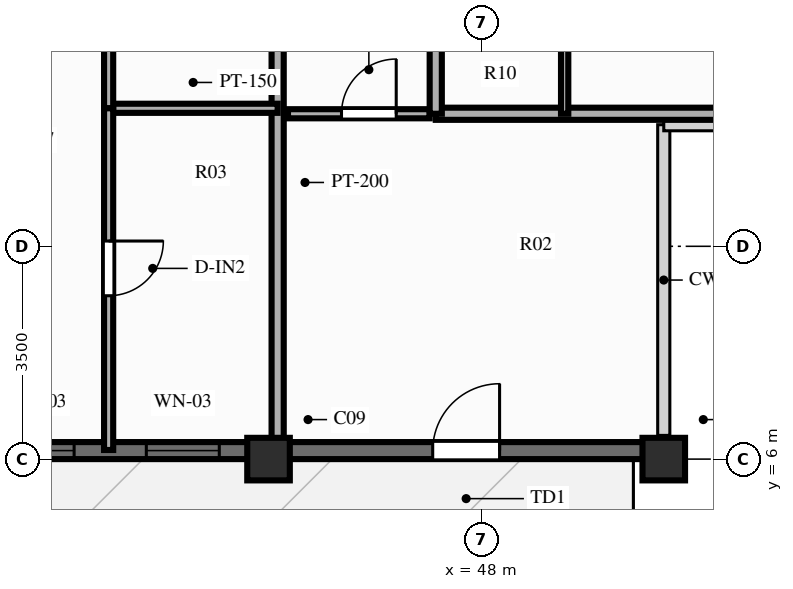
"""IFC4 building model, lengths in metres.
Left out: names, types, materials, properties, quantities, classifications, styles, units other than length and angle.
Written with IfcOpenShell. Run it as: python <this file> out.ifc"""

import sys

from ifc_helpers import new_model, si_unit, direction, frame, frame_2d, origin, origin_2d, place, context, subcontext, project, spatial, rectangle, extrude, source, transform, mapped, element, fill, save


model = new_model("IFC4")
c1 = context("Model", 3, precision=1e-05, world=origin(), true_north=direction((0.0, 1.0)))
c2 = subcontext(c1, "Body", "Model", "MODEL_VIEW")
j1 = project(units=[si_unit("LENGTHUNIT", "METRE"), si_unit("PLANEANGLEUNIT", "RADIAN")], contexts=[c1])
p1 = place(None, origin())
s1 = spatial("IfcSite", under=j1, at=p1, CompositionType="ELEMENT")
p2 = place(p1, origin())
s2 = spatial("IfcBuilding", under=s1, at=p2, CompositionType="ELEMENT")
p3 = place(p2, frame((0.0, 0.0, 216.3)))
s3 = spatial("IfcBuildingStorey", under=s2, at=p3, CompositionType="ELEMENT", Elevation=216.3)
m1 = source(origin(), c2, "Body", "SweptSolid", [
    extrude(rectangle(XDim=0.7, YDim=0.7, at=origin_2d()), origin(), (0.0, 0.0, 1.0), 3.9),
])
for number, where, z_axis, x_axis in (
    (1, (44.5, 6.0, 0.0), (0.0, 0.0, 1.0), (1.0, 0.0, 0.0)),
    (2, (51.0, 6.0, 0.0), (0.0, 0.0, 1.0), (1.0, 0.0, 0.0)),
):
    element("IfcColumn", number, at=place(p3, frame(where, z_axis=z_axis, x_axis=x_axis)), inside=s3, PredefinedType="COLUMN", context=c2, shape_type="MappedRepresentation", body=[
        mapped(m1, transform((0.0, 0.0, 0.0), scale=1.0)),
    ])
p4 = place(p3, frame((25.0, 6.14, 0.0), z_axis=(0.0, 0.0, 1.0), x_axis=(1.0, 0.0, 0.0)))
e3 = element("IfcWall", 3, at=p4, inside=s3, PredefinedType="SOLIDWALL", context=c2, shape_type="SweptSolid", body=[
    extrude(rectangle(XDim=26.0, YDim=0.28, at=frame_2d((13.0, 0.0))), origin(), (0.0, 0.0, 1.0), 2.44),
])
p5 = place(p4, frame((2.65, 0.0, 0.25)))
e4 = element("IfcOpeningElement", 4, at=p5, cuts=e3, PredefinedType="OPENING", context=c2, shape_type="SweptSolid", body=[
    extrude(rectangle(XDim=1.2, YDim=1.5, at=frame_2d((0.6, 0.75))), frame((0.0, 0.152, 0.0), z_axis=(0.0, -1.0, 0.0), x_axis=(1.0, 0.0, 0.0)), (0.0, 0.0, 1.0), 0.304),
])
p6 = place(p4, frame((7.296, 0.0, 0.25)))
e5 = element("IfcOpeningElement", 5, at=p6, cuts=e3, PredefinedType="OPENING", context=c2, shape_type="SweptSolid", body=[
    extrude(rectangle(XDim=1.2, YDim=1.5, at=frame_2d((0.6, 0.75))), frame((0.0, 0.152, 0.0), z_axis=(0.0, -1.0, 0.0), x_axis=(1.0, 0.0, 0.0)), (0.0, 0.0, 1.0), 0.304),
])
p7 = place(p4, frame((10.119, 0.0, 0.25)))
e6 = element("IfcOpeningElement", 6, at=p7, cuts=e3, PredefinedType="OPENING", context=c2, shape_type="SweptSolid", body=[
    extrude(rectangle(XDim=1.2, YDim=1.5, at=frame_2d((0.6, 0.75))), frame((0.0, 0.152, 0.0), z_axis=(0.0, -1.0, 0.0), x_axis=(1.0, 0.0, 0.0)), (0.0, 0.0, 1.0), 0.304),
])
p8 = place(p4, frame((12.835, 0.0, 0.25)))
e7 = element("IfcOpeningElement", 7, at=p8, cuts=e3, PredefinedType="OPENING", context=c2, shape_type="SweptSolid", body=[
    extrude(rectangle(XDim=1.2, YDim=1.5, at=frame_2d((0.6, 0.75))), frame((0.0, 0.152, 0.0), z_axis=(0.0, -1.0, 0.0), x_axis=(1.0, 0.0, 0.0)), (0.0, 0.0, 1.0), 0.304),
])
p9 = place(p4, frame((15.103, 0.0, 0.25)))
e8 = element("IfcOpeningElement", 8, at=p9, cuts=e3, PredefinedType="OPENING", context=c2, shape_type="SweptSolid", body=[
    extrude(rectangle(XDim=1.2, YDim=1.5, at=frame_2d((0.6, 0.75))), frame((0.0, 0.152, 0.0), z_axis=(0.0, -1.0, 0.0), x_axis=(1.0, 0.0, 0.0)), (0.0, 0.0, 1.0), 0.304),
])
p10 = place(p4, frame((17.49, 0.0, 0.25)))
e9 = element("IfcOpeningElement", 9, at=p10, cuts=e3, PredefinedType="OPENING", context=c2, shape_type="SweptSolid", body=[
    extrude(rectangle(XDim=1.2, YDim=1.5, at=frame_2d((0.6, 0.75))), frame((0.0, 0.152, 0.0), z_axis=(0.0, -1.0, 0.0), x_axis=(1.0, 0.0, 0.0)), (0.0, 0.0, 1.0), 0.304),
])
p11 = place(p4, frame((23.3, 0.0, 0.0), z_axis=(0.0, 0.0, 1.0), x_axis=(-1.0, 0.0, 0.0)))
e10 = element("IfcOpeningElement", 10, at=p11, cuts=e3, PredefinedType="OPENING", context=c2, shape_type="SweptSolid", body=[
    extrude(rectangle(XDim=1.1, YDim=2.15, at=frame_2d((0.55, 1.075))), frame((0.0, 0.152, 0.0), z_axis=(0.0, -1.0, 0.0), x_axis=(1.0, 0.0, 0.0)), (0.0, 0.0, 1.0), 0.304),
])
p12 = place(p3, frame((44.82, 11.68, 0.0), z_axis=(0.0, 0.0, 1.0), x_axis=(1.0, 0.0, 0.0)))
e11 = element("IfcWall", 11, at=p12, inside=s3, PredefinedType="PARTITIONING", context=c2, shape_type="SweptSolid", body=[
    extrude(rectangle(XDim=2.33, YDim=0.15, at=frame_2d((1.165, 0.0))), origin(), (0.0, 0.0, 1.0), 2.24),
])
p13 = place(p12, frame((0.88, 0.0, 0.0)))
e12 = element("IfcOpeningElement", 12, at=p13, cuts=e11, PredefinedType="OPENING", context=c2, shape_type="SweptSolid", body=[
    extrude(rectangle(XDim=0.9, YDim=2.1, at=frame_2d((0.45, 1.05))), frame((0.0, 0.087, 0.0), z_axis=(0.0, -1.0, 0.0), x_axis=(1.0, 0.0, 0.0)), (0.0, 0.0, 1.0), 0.174),
])
p14 = place(p3, frame((44.65, 14.95, 0.0), z_axis=(0.0, 0.0, 1.0), x_axis=(0.0, -1.0, 0.0)))
e13 = element("IfcWall", 13, at=p14, inside=s3, PredefinedType="PARTITIONING", context=c2, shape_type="SweptSolid", body=[
    extrude(rectangle(XDim=8.8, YDim=0.2, at=frame_2d((4.4, 0.0))), origin(), (0.0, 0.0, 1.0), 2.44),
])
p15 = place(p3, frame((41.87, 11.77, 0.0), z_axis=(0.0, 0.0, 1.0), x_axis=(1.0, 0.0, 0.0)))
e14 = element("IfcWall", 14, at=p15, inside=s3, PredefinedType="PARTITIONING", context=c2, shape_type="SweptSolid", body=[
    extrude(rectangle(XDim=2.78, YDim=0.15, at=frame_2d((1.39, 0.0))), origin(), (0.0, 0.0, 1.0), 3.39),
])
p16 = place(p3, frame((41.87, 14.95, 0.0), z_axis=(0.0, 0.0, 1.0), x_axis=(0.0, -1.0, 0.0)))
e15 = element("IfcWall", 15, at=p16, inside=s3, PredefinedType="PARTITIONING", context=c2, shape_type="SweptSolid", body=[
    extrude(rectangle(XDim=3.18, YDim=0.15, at=frame_2d((1.59, 0.0))), origin(), (0.0, 0.0, 1.0), 3.56),
])
p17 = place(p16, frame((1.14, 0.0, 0.0)))
e16 = element("IfcOpeningElement", 16, at=p17, cuts=e15, PredefinedType="OPENING", context=c2, shape_type="SweptSolid", body=[
    extrude(rectangle(XDim=0.9, YDim=2.1, at=frame_2d((0.45, 1.05))), frame((0.0, 0.087, 0.0), z_axis=(0.0, -1.0, 0.0), x_axis=(1.0, 0.0, 0.0)), (0.0, 0.0, 1.0), 0.174),
])
p18 = place(p3, frame((41.87, 11.77, 0.0), z_axis=(0.0, 0.0, 1.0), x_axis=(0.0, -1.0, 0.0)))
e17 = element("IfcWall", 17, at=p18, inside=s3, PredefinedType="PARTITIONING", context=c2, shape_type="SweptSolid", body=[
    extrude(rectangle(XDim=5.62, YDim=0.15, at=frame_2d((2.81, 0.0))), origin(), (0.0, 0.0, 1.0), 3.56),
])
p19 = place(p18, frame((2.183, 0.0, 0.0)))
e18 = element("IfcOpeningElement", 18, at=p19, cuts=e17, PredefinedType="OPENING", context=c2, shape_type="SweptSolid", body=[
    extrude(rectangle(XDim=0.9, YDim=2.1, at=frame_2d((0.45, 1.05))), frame((0.0, 0.087, 0.0), z_axis=(0.0, -1.0, 0.0), x_axis=(1.0, 0.0, 0.0)), (0.0, 0.0, 1.0), 0.174),
])
p20 = place(p3, frame((47.25, 11.68, 0.0), z_axis=(0.0, 0.0, 1.0), x_axis=(1.0, 0.0, 0.0)))
e19 = element("IfcWall", 19, at=p20, inside=s3, PredefinedType="PARTITIONING", context=c2, shape_type="SweptSolid", body=[
    extrude(rectangle(XDim=9.1, YDim=0.2, at=frame_2d((4.55, 0.0))), origin(), (0.0, 0.0, 1.0), 2.24),
])
p21 = place(p3, frame((47.25, 11.68, 0.0), z_axis=(0.0, 0.0, 1.0), x_axis=(0.0, 1.0, 0.0)))
e20 = element("IfcWall", 20, at=p21, inside=s3, PredefinedType="PARTITIONING", context=c2, shape_type="SweptSolid", body=[
    extrude(rectangle(XDim=2.75, YDim=0.2, at=frame_2d((1.375, 0.0))), origin(), (0.0, 0.0, 1.0), 3.56),
])
p22 = place(p3, frame((49.37, 11.68, 0.0), z_axis=(0.0, 0.0, 1.0), x_axis=(0.0, 1.0, 0.0)))
e21 = element("IfcWall", 21, at=p22, inside=s3, PredefinedType="PARTITIONING", context=c2, shape_type="SweptSolid", body=[
    extrude(rectangle(XDim=2.75, YDim=0.12, at=frame_2d((1.375, 0.0))), origin(), (0.0, 0.0, 1.0), 2.24),
])
m2 = source(origin(), c2, "Body", "SweptSolid", [
    extrude(rectangle(XDim=1.2, YDim=1.5, at=frame_2d((0.6, 0.75))), frame((0.0, 0.03, 0.0), z_axis=(0.0, -1.0, 0.0), x_axis=(1.0, 0.0, 0.0)), (0.0, 0.0, 1.0), 0.06),
])
p23 = place(p9, origin())
e22 = element("IfcWindow", 22, at=p23, inside=s3, PartitioningType="SINGLE_PANEL", PredefinedType="WINDOW", context=c2, shape_type="MappedRepresentation", body=[
    mapped(m2, transform((0.0, 0.0, 0.0), scale=1.0)),
])
fill(e8, e22)
p24 = place(p10, origin())
e23 = element("IfcWindow", 23, at=p24, inside=s3, PartitioningType="SINGLE_PANEL", PredefinedType="WINDOW", context=c2, shape_type="MappedRepresentation", body=[
    mapped(m2, transform((0.0, 0.0, 0.0), scale=1.0)),
])
fill(e9, e23)
m3 = source(origin(), c2, "Body", "SweptSolid", [
    extrude(rectangle(XDim=1.1, YDim=2.15, at=frame_2d((0.55, 1.075))), frame((0.0, 0.025, 0.0), z_axis=(0.0, -1.0, 0.0), x_axis=(1.0, 0.0, 0.0)), (0.0, 0.0, 1.0), 0.05),
])
p25 = place(p11, origin())
e24 = element("IfcDoor", 24, at=p25, inside=s3, OperationType="SINGLE_SWING_LEFT", PredefinedType="DOOR", context=c2, shape_type="MappedRepresentation", body=[
    mapped(m3, transform((0.0, 0.0, 0.0), scale=1.0)),
])
fill(e10, e24)
m4 = source(origin(), c2, "Body", "SweptSolid", [
    extrude(rectangle(XDim=0.9, YDim=2.1, at=frame_2d((0.45, 1.05))), frame((0.0, 0.025, 0.0), z_axis=(0.0, -1.0, 0.0), x_axis=(1.0, 0.0, 0.0)), (0.0, 0.0, 1.0), 0.05),
])
p26 = place(p13, origin())
e25 = element("IfcDoor", 25, at=p26, inside=s3, OperationType="SINGLE_SWING_RIGHT", PredefinedType="DOOR", context=c2, shape_type="MappedRepresentation", body=[
    mapped(m4, transform((0.0, 0.0, 0.0), scale=1.0)),
])
fill(e12, e25)
p27 = place(p19, origin())
e26 = element("IfcDoor", 26, at=p27, inside=s3, OperationType="SINGLE_SWING_LEFT", PredefinedType="DOOR", context=c2, shape_type="MappedRepresentation", body=[
    mapped(m4, transform((0.0, 0.0, 0.0), scale=1.0)),
])
fill(e18, e26)
save(model, sys.argv[1])
